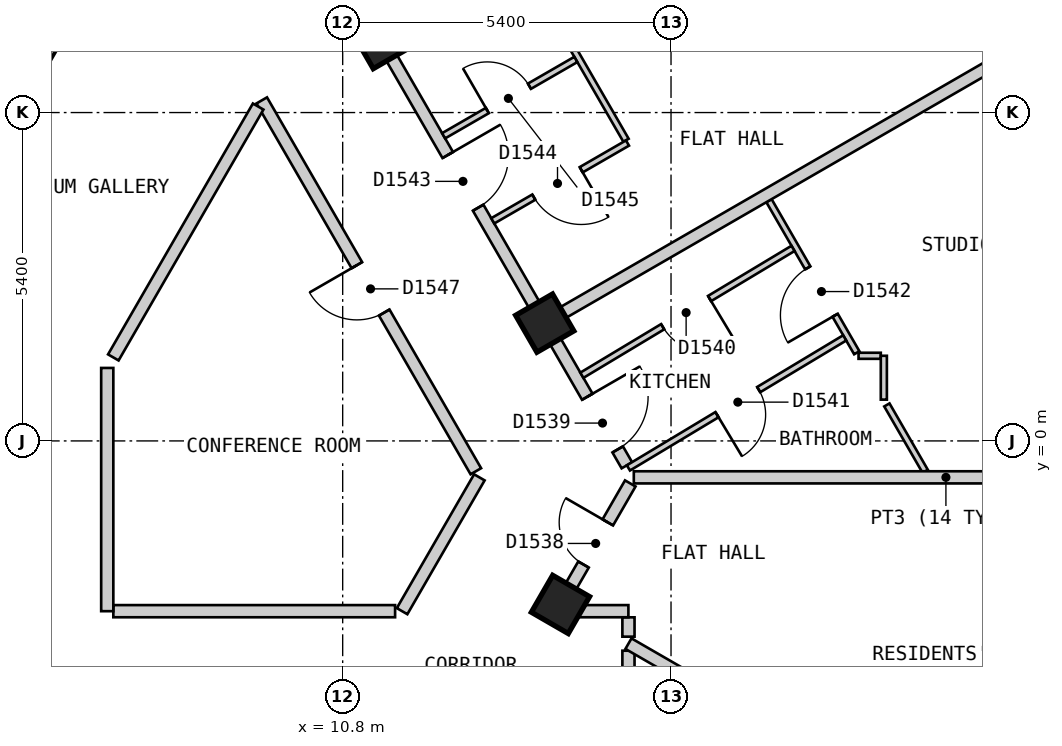
"""IFC4 building model, lengths in metres.
Left out: names, types, materials, properties, quantities, classifications, styles, units other than length and angle.
Written with IfcOpenShell. Run it as: python <this file> out.ifc"""

import sys

from ifc_helpers import new_model, si_unit, direction, frame, frame_2d, origin, origin_2d, place, context, subcontext, project, spatial, polyline, rectangle, outline, extrude, element, fill, save


model = new_model("IFC4")
c1 = context("Model", 3, precision=1e-05, world=origin(), true_north=direction((0.0, 1.0)))
c2 = subcontext(c1, "Body", "Model", "MODEL_VIEW")
j1 = project(units=[si_unit("LENGTHUNIT", "METRE"), si_unit("PLANEANGLEUNIT", "RADIAN")], contexts=[c1])
p1 = place(None, origin())
s1 = spatial("IfcSite", under=j1, at=p1, CompositionType="ELEMENT")
p2 = place(p1, origin())
s2 = spatial("IfcBuilding", under=s1, at=p2, CompositionType="ELEMENT")
p3 = place(p2, frame((0.0, 0.0, 196.2)))
s3 = spatial("IfcBuildingStorey", under=s2, at=p3, CompositionType="ELEMENT", Elevation=196.2)
for number, where, z_axis, x_axis in (
    (1, (14.382, -2.689, 0.0), (0.0, 0.0, 1.0), (0.5, 0.866, 0.0)),
    (2, (14.123, 1.937, 0.0), (0.0, 0.0, 1.0), (-0.5, 0.866, 0.0)),
    (3, (11.431, 6.6, 0.0), (0.0, 0.0, 1.0), (-0.5, 0.866, 0.0)),
):
    element("IfcColumn", number, at=place(p3, frame(where, z_axis=z_axis, x_axis=x_axis)), inside=s3, PredefinedType="COLUMN", context=c2, shape_type="SweptSolid", body=[
        extrude(rectangle(XDim=0.7, YDim=0.7, at=origin_2d()), origin(), (0.0, 0.0, 1.0), 3.0),
    ])
p4 = place(p3, frame((15.631, -21.025, 0.0), z_axis=(0.0, 0.0, 1.0), x_axis=(0.500018670445, 0.86601462413, 0.0)))
e4 = element("IfcWall", 4, at=p4, inside=s3, PredefinedType="SOLIDWALL", context=c2, shape_type="SweptSolid", body=[
    extrude(outline(polyline([(0.0, -0.15), (20.785, -0.15), (20.705, 0.15), (0.08, 0.15), (0.0, -0.15)])), origin(), (0.0, 0.0, 1.0), 2.6),
])
p5 = place(p4, frame((1.13, 0.0, 0.15)))
e5 = element("IfcOpeningElement", 5, at=p5, cuts=e4, PredefinedType="OPENING", context=c2, shape_type="SweptSolid", body=[
    extrude(rectangle(XDim=1.5, YDim=2.1, at=frame_2d((0.75, 1.05))), frame((0.0, 0.16, 0.0), z_axis=(0.0, -1.0, 0.0), x_axis=(1.0, 0.0, 0.0)), (0.0, 0.0, 1.0), 0.32),
])
p6 = place(p4, frame((3.562, 0.0, 0.15)))
e6 = element("IfcOpeningElement", 6, at=p6, cuts=e4, PredefinedType="OPENING", context=c2, shape_type="SweptSolid", body=[
    extrude(rectangle(XDim=1.5, YDim=2.1, at=frame_2d((0.75, 1.05))), frame((0.0, 0.16, 0.0), z_axis=(0.0, -1.0, 0.0), x_axis=(1.0, 0.0, 0.0)), (0.0, 0.0, 1.0), 0.32),
])
p7 = place(p4, frame((5.994, 0.0, 0.15)))
e7 = element("IfcOpeningElement", 7, at=p7, cuts=e4, PredefinedType="OPENING", context=c2, shape_type="SweptSolid", body=[
    extrude(rectangle(XDim=1.5, YDim=2.1, at=frame_2d((0.75, 1.05))), frame((0.0, 0.16, 0.0), z_axis=(0.0, -1.0, 0.0), x_axis=(1.0, 0.0, 0.0)), (0.0, 0.0, 1.0), 0.32),
])
p8 = place(p4, frame((8.425, 0.0, 0.15)))
e8 = element("IfcOpeningElement", 8, at=p8, cuts=e4, PredefinedType="OPENING", context=c2, shape_type="SweptSolid", body=[
    extrude(rectangle(XDim=1.5, YDim=2.1, at=frame_2d((0.75, 1.05))), frame((0.0, 0.16, 0.0), z_axis=(0.0, -1.0, 0.0), x_axis=(1.0, 0.0, 0.0)), (0.0, 0.0, 1.0), 0.32),
])
p9 = place(p4, frame((10.857, 0.0, 0.15)))
e9 = element("IfcOpeningElement", 9, at=p9, cuts=e4, PredefinedType="OPENING", context=c2, shape_type="SweptSolid", body=[
    extrude(rectangle(XDim=1.5, YDim=2.1, at=frame_2d((0.75, 1.05))), frame((0.0, 0.16, 0.0), z_axis=(0.0, -1.0, 0.0), x_axis=(1.0, 0.0, 0.0)), (0.0, 0.0, 1.0), 0.32),
])
p10 = place(p4, frame((13.289, 0.0, 0.15)))
e10 = element("IfcOpeningElement", 10, at=p10, cuts=e4, PredefinedType="OPENING", context=c2, shape_type="SweptSolid", body=[
    extrude(rectangle(XDim=1.5, YDim=2.1, at=frame_2d((0.75, 1.05))), frame((0.0, 0.16, 0.0), z_axis=(0.0, -1.0, 0.0), x_axis=(1.0, 0.0, 0.0)), (0.0, 0.0, 1.0), 0.32),
])
p11 = place(p4, frame((15.722, 0.0, 0.15)))
e11 = element("IfcOpeningElement", 11, at=p11, cuts=e4, PredefinedType="OPENING", context=c2, shape_type="SweptSolid", body=[
    extrude(rectangle(XDim=1.5, YDim=2.1, at=frame_2d((0.75, 1.05))), frame((0.0, 0.16, 0.0), z_axis=(0.0, -1.0, 0.0), x_axis=(1.0, 0.0, 0.0)), (0.0, 0.0, 1.0), 0.32),
])
p12 = place(p4, frame((18.154, 0.0, 0.15)))
e12 = element("IfcOpeningElement", 12, at=p12, cuts=e4, PredefinedType="OPENING", context=c2, shape_type="SweptSolid", body=[
    extrude(rectangle(XDim=1.5, YDim=2.1, at=frame_2d((0.75, 1.05))), frame((0.0, 0.16, 0.0), z_axis=(0.0, -1.0, 0.0), x_axis=(1.0, 0.0, 0.0)), (0.0, 0.0, 1.0), 0.32),
])
p13 = place(p3, frame((26.024, 1.825, 0.0), z_axis=(0.0, 0.0, 1.0), x_axis=(-0.500010537973, 0.866019319597, 0.0)))
e13 = element("IfcWall", 13, at=p13, inside=s3, PredefinedType="SOLIDWALL", context=c2, shape_type="SweptSolid", body=[
    extrude(outline(polyline([(0.0, -0.15), (22.863, -0.15), (22.783, 0.15), (0.08, 0.15), (0.0, -0.15)])), origin(), (0.0, 0.0, 1.0), 2.6),
])
p14 = place(p13, frame((1.259, 0.0, 0.15)))
e14 = element("IfcOpeningElement", 14, at=p14, cuts=e13, PredefinedType="OPENING", context=c2, shape_type="SweptSolid", body=[
    extrude(rectangle(XDim=1.5, YDim=2.1, at=frame_2d((0.75, 1.05))), frame((0.0, 0.16, 0.0), z_axis=(0.0, -1.0, 0.0), x_axis=(1.0, 0.0, 0.0)), (0.0, 0.0, 1.0), 0.32),
])
p15 = place(p13, frame((3.952, 0.0, 0.15)))
e15 = element("IfcOpeningElement", 15, at=p15, cuts=e13, PredefinedType="OPENING", context=c2, shape_type="SweptSolid", body=[
    extrude(rectangle(XDim=1.5, YDim=2.1, at=frame_2d((0.75, 1.05))), frame((0.0, 0.16, 0.0), z_axis=(0.0, -1.0, 0.0), x_axis=(1.0, 0.0, 0.0)), (0.0, 0.0, 1.0), 0.32),
])
p16 = place(p13, frame((6.644, 0.0, 0.15)))
e16 = element("IfcOpeningElement", 16, at=p16, cuts=e13, PredefinedType="OPENING", context=c2, shape_type="SweptSolid", body=[
    extrude(rectangle(XDim=1.5, YDim=2.1, at=frame_2d((0.75, 1.05))), frame((0.0, 0.16, 0.0), z_axis=(0.0, -1.0, 0.0), x_axis=(1.0, 0.0, 0.0)), (0.0, 0.0, 1.0), 0.32),
])
p17 = place(p13, frame((9.335, 0.0, 0.15)))
e17 = element("IfcOpeningElement", 17, at=p17, cuts=e13, PredefinedType="OPENING", context=c2, shape_type="SweptSolid", body=[
    extrude(rectangle(XDim=1.5, YDim=2.1, at=frame_2d((0.75, 1.05))), frame((0.0, 0.16, 0.0), z_axis=(0.0, -1.0, 0.0), x_axis=(1.0, 0.0, 0.0)), (0.0, 0.0, 1.0), 0.32),
])
p18 = place(p13, frame((12.028, 0.0, 0.15)))
e18 = element("IfcOpeningElement", 18, at=p18, cuts=e13, PredefinedType="OPENING", context=c2, shape_type="SweptSolid", body=[
    extrude(rectangle(XDim=1.5, YDim=2.1, at=frame_2d((0.75, 1.05))), frame((0.0, 0.16, 0.0), z_axis=(0.0, -1.0, 0.0), x_axis=(1.0, 0.0, 0.0)), (0.0, 0.0, 1.0), 0.32),
])
p19 = place(p13, frame((14.72, 0.0, 0.15)))
e19 = element("IfcOpeningElement", 19, at=p19, cuts=e13, PredefinedType="OPENING", context=c2, shape_type="SweptSolid", body=[
    extrude(rectangle(XDim=1.5, YDim=2.1, at=frame_2d((0.75, 1.05))), frame((0.0, 0.16, 0.0), z_axis=(0.0, -1.0, 0.0), x_axis=(1.0, 0.0, 0.0)), (0.0, 0.0, 1.0), 0.32),
])
p20 = place(p13, frame((17.411, 0.0, 0.15)))
e20 = element("IfcOpeningElement", 20, at=p20, cuts=e13, PredefinedType="OPENING", context=c2, shape_type="SweptSolid", body=[
    extrude(rectangle(XDim=1.5, YDim=2.1, at=frame_2d((0.75, 1.05))), frame((0.0, 0.16, 0.0), z_axis=(0.0, -1.0, 0.0), x_axis=(1.0, 0.0, 0.0)), (0.0, 0.0, 1.0), 0.32),
])
p21 = place(p13, frame((20.104, 0.0, 0.15)))
e21 = element("IfcOpeningElement", 21, at=p21, cuts=e13, PredefinedType="OPENING", context=c2, shape_type="SweptSolid", body=[
    extrude(rectangle(XDim=1.5, YDim=2.1, at=frame_2d((0.75, 1.05))), frame((0.0, 0.16, 0.0), z_axis=(0.0, -1.0, 0.0), x_axis=(1.0, 0.0, 0.0)), (0.0, 0.0, 1.0), 0.32),
])
p22 = place(p3, frame((9.469, 5.6, 0.0), z_axis=(0.0, 0.0, 1.0), x_axis=(0.499964524401, -0.866045884662, 0.0)))
e22 = element("IfcWall", 22, at=p22, inside=s3, PredefinedType="PARTITIONING", context=c2, shape_type="SweptSolid", body=[
    extrude(rectangle(XDim=7.042, YDim=0.2, at=frame_2d((3.521, 0.0))), origin(), (0.0, 0.0, 1.0), 2.6),
])
p23 = place(p22, frame((3.129, 0.0, 0.0)))
e23 = element("IfcOpeningElement", 23, at=p23, cuts=e22, PredefinedType="OPENING", context=c2, shape_type="SweptSolid", body=[
    extrude(rectangle(XDim=0.9, YDim=2.1, at=frame_2d((0.45, 1.05))), frame((0.0, 0.11, 0.0), z_axis=(0.0, -1.0, 0.0), x_axis=(1.0, 0.0, 0.0)), (0.0, 0.0, 1.0), 0.22),
])
p24 = place(p3, frame((10.739, 7.8, 0.0), z_axis=(0.0, 0.0, 1.0), x_axis=(0.500023726918, -0.866011704609, 0.0)))
e24 = element("IfcWall", 24, at=p24, inside=s3, PredefinedType="PARTITIONING", context=c2, shape_type="SweptSolid", body=[
    extrude(rectangle(XDim=9.47, YDim=0.2, at=frame_2d((4.735, 0.0))), origin(), (0.0, 0.0, 1.0), 2.6),
])
p25 = place(p24, frame((8.168, 0.0, 0.0)))
e25 = element("IfcOpeningElement", 25, at=p25, cuts=e24, PredefinedType="OPENING", context=c2, shape_type="SweptSolid", body=[
    extrude(rectangle(XDim=1.0, YDim=2.1, at=frame_2d((0.5, 1.05))), frame((0.0, 0.11, 0.0), z_axis=(0.0, -1.0, 0.0), x_axis=(1.0, 0.0, 0.0)), (0.0, 0.0, 1.0), 0.22),
])
p26 = place(p24, frame((3.578, 0.0, 0.0)))
e26 = element("IfcOpeningElement", 26, at=p26, cuts=e24, PredefinedType="OPENING", context=c2, shape_type="SweptSolid", body=[
    extrude(rectangle(XDim=1.0, YDim=2.1, at=frame_2d((0.5, 1.05))), frame((0.0, 0.11, 0.0), z_axis=(0.0, -1.0, 0.0), x_axis=(1.0, 0.0, 0.0)), (0.0, 0.0, 1.0), 0.22),
])
p27 = place(p3, frame((15.5, -2.901, 0.0), z_axis=(0.0, 0.0, 1.0), x_axis=(0.0, -1.0, 0.0)))
e27 = element("IfcWall", 27, at=p27, inside=s3, PredefinedType="PARTITIONING", context=c2, shape_type="SweptSolid", body=[
    extrude(rectangle(XDim=0.318, YDim=0.2, at=frame_2d((0.159, 0.0))), origin(), (0.0, 0.0, 1.0), 2.6),
])
p28 = place(p3, frame((7.028, -2.8, 0.0), z_axis=(0.0, 0.0, 1.0), x_axis=(1.0, 0.0, 0.0)))
e28 = element("IfcWall", 28, at=p28, inside=s3, PredefinedType="PARTITIONING", context=c2, shape_type="SweptSolid", body=[
    extrude(rectangle(XDim=4.634, YDim=0.2, at=frame_2d((2.317, 0.0))), origin(), (0.0, 0.0, 1.0), 2.6),
])
p29 = place(p3, frame((14.433, -2.8, 0.0), z_axis=(0.0, 0.0, 1.0), x_axis=(1.0, 0.0, 0.0)))
e29 = element("IfcWall", 29, at=p29, inside=s3, PredefinedType="PARTITIONING", context=c2, shape_type="SweptSolid", body=[
    extrude(rectangle(XDim=1.066, YDim=0.2, at=frame_2d((0.533, 0.0))), origin(), (0.0, 0.0, 1.0), 2.6),
])
p30 = place(p3, frame((7.028, 1.373, 0.0), z_axis=(0.0, 0.0, 1.0), x_axis=(0.499953126767, 0.866052464367, 0.0)))
e30 = element("IfcWall", 30, at=p30, inside=s3, PredefinedType="PARTITIONING", context=c2, shape_type="SweptSolid", body=[
    extrude(rectangle(XDim=4.764, YDim=0.2, at=frame_2d((2.382, 0.0))), origin(), (0.0, 0.0, 1.0), 2.6),
])
p31 = place(p3, frame((11.777, -2.8, 0.0), z_axis=(0.0, 0.0, 1.0), x_axis=(0.500085537782, 0.86597601289, 0.0)))
e31 = element("IfcWall", 31, at=p31, inside=s3, PredefinedType="PARTITIONING", context=c2, shape_type="SweptSolid", body=[
    extrude(rectangle(XDim=2.542, YDim=0.2, at=frame_2d((1.271, 0.0))), origin(), (0.0, 0.0, 1.0), 2.6),
])
p32 = place(p3, frame((14.318, -2.8, 0.0), z_axis=(0.0, 0.0, 1.0), x_axis=(0.49964693309, 0.866229151122, 0.0)))
e32 = element("IfcWall", 32, at=p32, inside=s3, PredefinedType="PARTITIONING", context=c2, shape_type="SweptSolid", body=[
    extrude(rectangle(XDim=2.426, YDim=0.2, at=frame_2d((1.213, 0.0))), origin(), (0.0, 0.0, 1.0), 2.6),
])
p33 = place(p32, frame((0.886, 0.0, 0.0)))
e33 = element("IfcOpeningElement", 33, at=p33, cuts=e32, PredefinedType="OPENING", context=c2, shape_type="SweptSolid", body=[
    extrude(rectangle(XDim=0.8, YDim=2.1, at=frame_2d((0.4, 1.05))), frame((0.0, 0.11, 0.0), z_axis=(0.0, -1.0, 0.0), x_axis=(1.0, 0.0, 0.0)), (0.0, 0.0, 1.0), 0.22),
])
p34 = place(p3, frame((6.928, -2.8, 0.0), z_axis=(0.0, 0.0, 1.0), x_axis=(0.0, 1.0, 0.0)))
e34 = element("IfcWall", 34, at=p34, inside=s3, PredefinedType="PARTITIONING", context=c2, shape_type="SweptSolid", body=[
    extrude(rectangle(XDim=4.0, YDim=0.2, at=frame_2d((2.0, 0.0))), origin(), (0.0, 0.0, 1.0), 2.6),
])
p35 = place(p3, frame((15.5, -18.799, 0.0), z_axis=(0.0, 0.0, 1.0), x_axis=(0.0, 1.0, 0.0)))
e35 = element("IfcWall", 35, at=p35, inside=s3, PredefinedType="PARTITIONING", context=c2, shape_type="SweptSolid", body=[
    extrude(rectangle(XDim=15.349, YDim=0.2, at=frame_2d((7.675, 0.0))), origin(), (0.0, 0.0, 1.0), 2.6),
])
p36 = place(p35, frame((4.477, 0.0, 0.0)))
e36 = element("IfcOpeningElement", 36, at=p36, cuts=e35, PredefinedType="OPENING", context=c2, shape_type="SweptSolid", body=[
    extrude(rectangle(XDim=0.8, YDim=2.1, at=frame_2d((0.4, 1.05))), frame((0.0, 0.11, 0.0), z_axis=(0.0, -1.0, 0.0), x_axis=(1.0, 0.0, 0.0)), (0.0, 0.0, 1.0), 0.22),
])
p37 = place(p35, frame((11.348, 0.0, 0.0)))
e37 = element("IfcOpeningElement", 37, at=p37, cuts=e35, PredefinedType="OPENING", context=c2, shape_type="SweptSolid", body=[
    extrude(rectangle(XDim=1.0, YDim=2.1, at=frame_2d((0.5, 1.05))), frame((0.0, 0.11, 0.0), z_axis=(0.0, -1.0, 0.0), x_axis=(1.0, 0.0, 0.0)), (0.0, 0.0, 1.0), 0.22),
])
p38 = place(p3, frame((13.785, 7.844, 0.0), z_axis=(0.0, 0.0, 1.0), x_axis=(0.500176784828, -0.865923312955, 0.0)))
e38 = element("IfcWall", 38, at=p38, inside=s3, PredefinedType="PARTITIONING", context=c2, shape_type="SweptSolid", body=[
    extrude(rectangle(XDim=3.349, YDim=0.1, at=frame_2d((1.674, 0.0))), origin(), (0.0, 0.0, 1.0), 2.6),
])
p39 = place(p3, frame((17.811, 3.951, 0.0), z_axis=(0.0, 0.0, 1.0), x_axis=(0.499976149225, -0.866039173598, 0.0)))
e39 = element("IfcWall", 39, at=p39, inside=s3, PredefinedType="PARTITIONING", context=c2, shape_type="SweptSolid", body=[
    extrude(rectangle(XDim=2.888, YDim=0.1, at=frame_2d((1.444, 0.0))), origin(), (0.0, 0.0, 1.0), 2.6),
])
p40 = place(p39, frame((1.276, 0.0, 0.0)))
e40 = element("IfcOpeningElement", 40, at=p40, cuts=e39, PredefinedType="OPENING", context=c2, shape_type="SweptSolid", body=[
    extrude(rectangle(XDim=0.9, YDim=2.1, at=frame_2d((0.45, 1.05))), frame((0.0, 0.06, 0.0), z_axis=(0.0, -1.0, 0.0), x_axis=(1.0, 0.0, 0.0)), (0.0, 0.0, 1.0), 0.12),
])
p41 = place(p3, frame((19.75, 0.592, 0.0), z_axis=(0.0, 0.0, 1.0), x_axis=(0.499974077718, -0.866040369504, 0.0)))
e41 = element("IfcWall", 41, at=p41, inside=s3, PredefinedType="PARTITIONING", context=c2, shape_type="SweptSolid", body=[
    extrude(rectangle(XDim=1.26, YDim=0.1, at=frame_2d((0.63, 0.0))), origin(), (0.0, 0.0, 1.0), 2.6),
])
p42 = place(p3, frame((19.284, 1.4, 0.0), z_axis=(0.0, 0.0, 1.0), x_axis=(1.0, 0.0, 0.0)))
e42 = element("IfcWall", 42, at=p42, inside=s3, PredefinedType="PARTITIONING", context=c2, shape_type="SweptSolid", body=[
    extrude(rectangle(XDim=0.366, YDim=0.1, at=frame_2d((0.183, 0.0))), origin(), (0.0, 0.0, 1.0), 2.6),
])
p43 = place(p3, frame((19.7, 0.679, 0.0), z_axis=(0.0, 0.0, 1.0), x_axis=(0.0, 1.0, 0.0)))
e43 = element("IfcWall", 43, at=p43, inside=s3, PredefinedType="PARTITIONING", context=c2, shape_type="SweptSolid", body=[
    extrude(rectangle(XDim=0.721, YDim=0.1, at=frame_2d((0.36, 0.0))), origin(), (0.0, 0.0, 1.0), 2.6),
])
p44 = place(p3, frame((13.268, 3.619, 0.0), z_axis=(0.0, 0.0, 1.0), x_axis=(0.865902724456, 0.500212426655, 0.0)))
e44 = element("IfcWall", 44, at=p44, inside=s3, PredefinedType="PARTITIONING", context=c2, shape_type="SweptSolid", body=[
    extrude(rectangle(XDim=2.559, YDim=0.1, at=frame_2d((1.28, 0.0))), origin(), (0.0, 0.0, 1.0), 2.6),
])
p45 = place(p44, frame((0.78, 0.0, 0.0)))
e45 = element("IfcOpeningElement", 45, at=p45, cuts=e44, PredefinedType="OPENING", context=c2, shape_type="SweptSolid", body=[
    extrude(rectangle(XDim=0.9, YDim=2.1, at=frame_2d((0.45, 1.05))), frame((0.0, 0.06, 0.0), z_axis=(0.0, -1.0, 0.0), x_axis=(1.0, 0.0, 0.0)), (0.0, 0.0, 1.0), 0.12),
])
p46 = place(p3, frame((12.46, 5.018, 0.0), z_axis=(0.0, 0.0, 1.0), x_axis=(0.866080321209, 0.499904868165, 0.0)))
e46 = element("IfcWall", 46, at=p46, inside=s3, PredefinedType="PARTITIONING", context=c2, shape_type="SweptSolid", body=[
    extrude(rectangle(XDim=2.51, YDim=0.1, at=frame_2d((1.255, 0.0))), origin(), (0.0, 0.0, 1.0), 2.6),
])
p47 = place(p46, frame((0.83, 0.0, 0.0)))
e47 = element("IfcOpeningElement", 47, at=p47, cuts=e46, PredefinedType="OPENING", context=c2, shape_type="SweptSolid", body=[
    extrude(rectangle(XDim=0.8, YDim=2.1, at=frame_2d((0.4, 1.05))), frame((0.0, 0.06, 0.0), z_axis=(0.0, -1.0, 0.0), x_axis=(1.0, 0.0, 0.0)), (0.0, 0.0, 1.0), 0.12),
])
p48 = place(p3, frame((14.734, 1.08, 0.0), z_axis=(0.0, 0.0, 1.0), x_axis=(0.857205608004, 0.514974315482, 0.0)))
e48 = element("IfcWall", 48, at=p48, inside=s3, PredefinedType="PARTITIONING", context=c2, shape_type="SweptSolid", body=[
    extrude(rectangle(XDim=4.051, YDim=0.1, at=frame_2d((2.025, 0.0))), origin(), (0.0, 0.0, 1.0), 2.6),
])
p49 = place(p48, frame((1.55, 0.0, 0.0)))
e49 = element("IfcOpeningElement", 49, at=p49, cuts=e48, PredefinedType="OPENING", context=c2, shape_type="SweptSolid", body=[
    extrude(rectangle(XDim=0.9, YDim=2.1, at=frame_2d((0.45, 1.05))), frame((0.0, 0.06, 0.0), z_axis=(0.0, -1.0, 0.0), x_axis=(1.0, 0.0, 0.0)), (0.0, 0.0, 1.0), 0.12),
])
p50 = place(p3, frame((15.499, -0.444, 0.0), z_axis=(0.0, 0.0, 1.0), x_axis=(0.857061798163, 0.515213619899, 0.0)))
e50 = element("IfcWall", 50, at=p50, inside=s3, PredefinedType="PARTITIONING", context=c2, shape_type="SweptSolid", body=[
    extrude(rectangle(XDim=4.15, YDim=0.1, at=frame_2d((2.075, 0.0))), origin(), (0.0, 0.0, 1.0), 2.6),
])
p51 = place(p50, frame((1.7, 0.0, 0.0)))
e51 = element("IfcOpeningElement", 51, at=p51, cuts=e50, PredefinedType="OPENING", context=c2, shape_type="SweptSolid", body=[
    extrude(rectangle(XDim=0.8, YDim=2.1, at=frame_2d((0.4, 1.05))), frame((0.0, 0.06, 0.0), z_axis=(0.0, -1.0, 0.0), x_axis=(1.0, 0.0, 0.0)), (0.0, 0.0, 1.0), 0.12),
])
p52 = place(p3, frame((15.5, -3.334, 0.0), z_axis=(0.0, 0.0, 1.0), x_axis=(0.866001896501, -0.5000407136, 0.0)))
e52 = element("IfcWall", 52, at=p52, inside=s3, PredefinedType="PARTITIONING", context=c2, shape_type="SweptSolid", body=[
    extrude(rectangle(XDim=8.809, YDim=0.2, at=frame_2d((4.405, 0.0))), origin(), (0.0, 0.0, 1.0), 2.6),
])
p53 = place(p3, frame((15.588, -0.599, 0.0), z_axis=(0.0, 0.0, 1.0), x_axis=(1.0, 0.0, 0.0)))
e53 = element("IfcWall", 53, at=p53, inside=s3, PredefinedType="PARTITIONING", context=c2, shape_type="SweptSolid", body=[
    extrude(rectangle(XDim=10.266, YDim=0.2, at=frame_2d((5.133, 0.0))), origin(), (0.0, 0.0, 1.0), 2.6),
])
p54 = place(p3, frame((14.21, 1.987, 0.0), z_axis=(0.0, 0.0, 1.0), x_axis=(0.866022959057, 0.500004234368, 0.0)))
e54 = element("IfcWall", 54, at=p54, inside=s3, PredefinedType="PARTITIONING", context=c2, shape_type="SweptSolid", body=[
    extrude(rectangle(XDim=10.0, YDim=0.2, at=frame_2d((5.0, 0.0))), origin(), (0.0, 0.0, 1.0), 2.6),
])
p55 = place(p33, origin())
e55 = element("IfcDoor", 55, at=p55, inside=s3, OperationType="SINGLE_SWING_RIGHT", PredefinedType="DOOR", context=c2, shape_type="SweptSolid", body=[
    extrude(rectangle(XDim=0.8, YDim=2.1, at=frame_2d((0.4, 1.05))), frame((0.0, 0.025, 0.0), z_axis=(0.0, -1.0, 0.0), x_axis=(1.0, 0.0, 0.0)), (0.0, 0.0, 1.0), 0.05),
])
fill(e33, e55)
p56 = place(p25, origin())
e56 = element("IfcDoor", 56, at=p56, inside=s3, OperationType="SINGLE_SWING_LEFT", PredefinedType="DOOR", context=c2, shape_type="SweptSolid", body=[
    extrude(rectangle(XDim=1.0, YDim=2.1, at=frame_2d((0.5, 1.05))), frame((0.0, 0.025, 0.0), z_axis=(0.0, -1.0, 0.0), x_axis=(1.0, 0.0, 0.0)), (0.0, 0.0, 1.0), 0.05),
])
fill(e25, e56)
p57 = place(p49, origin())
e57 = element("IfcDoor", 57, at=p57, inside=s3, OperationType="SINGLE_SWING_RIGHT", PredefinedType="DOOR", context=c2, shape_type="SweptSolid", body=[
    extrude(rectangle(XDim=0.9, YDim=2.1, at=frame_2d((0.45, 1.05))), frame((0.0, 0.025, 0.0), z_axis=(0.0, -1.0, 0.0), x_axis=(1.0, 0.0, 0.0)), (0.0, 0.0, 1.0), 0.05),
])
fill(e49, e57)
p58 = place(p51, origin())
e58 = element("IfcDoor", 58, at=p58, inside=s3, OperationType="SINGLE_SWING_LEFT", PredefinedType="DOOR", context=c2, shape_type="SweptSolid", body=[
    extrude(rectangle(XDim=0.8, YDim=2.1, at=frame_2d((0.4, 1.05))), frame((0.0, 0.025, 0.0), z_axis=(0.0, -1.0, 0.0), x_axis=(1.0, 0.0, 0.0)), (0.0, 0.0, 1.0), 0.05),
])
fill(e51, e58)
p59 = place(p40, origin())
e59 = element("IfcDoor", 59, at=p59, inside=s3, OperationType="SINGLE_SWING_RIGHT", PredefinedType="DOOR", context=c2, shape_type="SweptSolid", body=[
    extrude(rectangle(XDim=0.9, YDim=2.1, at=frame_2d((0.45, 1.05))), frame((0.0, 0.025, 0.0), z_axis=(0.0, -1.0, 0.0), x_axis=(1.0, 0.0, 0.0)), (0.0, 0.0, 1.0), 0.05),
])
fill(e40, e59)
p60 = place(p26, origin())
e60 = element("IfcDoor", 60, at=p60, inside=s3, OperationType="SINGLE_SWING_LEFT", PredefinedType="DOOR", context=c2, shape_type="SweptSolid", body=[
    extrude(rectangle(XDim=1.0, YDim=2.1, at=frame_2d((0.5, 1.05))), frame((0.0, 0.025, 0.0), z_axis=(0.0, -1.0, 0.0), x_axis=(1.0, 0.0, 0.0)), (0.0, 0.0, 1.0), 0.05),
])
fill(e26, e60)
p61 = place(p45, origin())
e61 = element("IfcDoor", 61, at=p61, inside=s3, OperationType="SINGLE_SWING_RIGHT", PredefinedType="DOOR", context=c2, shape_type="SweptSolid", body=[
    extrude(rectangle(XDim=0.9, YDim=2.1, at=frame_2d((0.45, 1.05))), frame((0.0, 0.025, 0.0), z_axis=(0.0, -1.0, 0.0), x_axis=(1.0, 0.0, 0.0)), (0.0, 0.0, 1.0), 0.05),
])
fill(e45, e61)
p62 = place(p47, origin())
e62 = element("IfcDoor", 62, at=p62, inside=s3, OperationType="SINGLE_SWING_LEFT", PredefinedType="DOOR", context=c2, shape_type="SweptSolid", body=[
    extrude(rectangle(XDim=0.8, YDim=2.1, at=frame_2d((0.4, 1.05))), frame((0.0, 0.025, 0.0), z_axis=(0.0, -1.0, 0.0), x_axis=(1.0, 0.0, 0.0)), (0.0, 0.0, 1.0), 0.05),
])
fill(e47, e62)
p63 = place(p23, origin())
e63 = element("IfcDoor", 63, at=p63, inside=s3, OperationType="SINGLE_SWING_LEFT", PredefinedType="DOOR", context=c2, shape_type="SweptSolid", body=[
    extrude(rectangle(XDim=0.9, YDim=2.1, at=frame_2d((0.45, 1.05))), frame((0.0, 0.025, 0.0), z_axis=(0.0, -1.0, 0.0), x_axis=(1.0, 0.0, 0.0)), (0.0, 0.0, 1.0), 0.05),
])
fill(e23, e63)
save(model, sys.argv[1])
